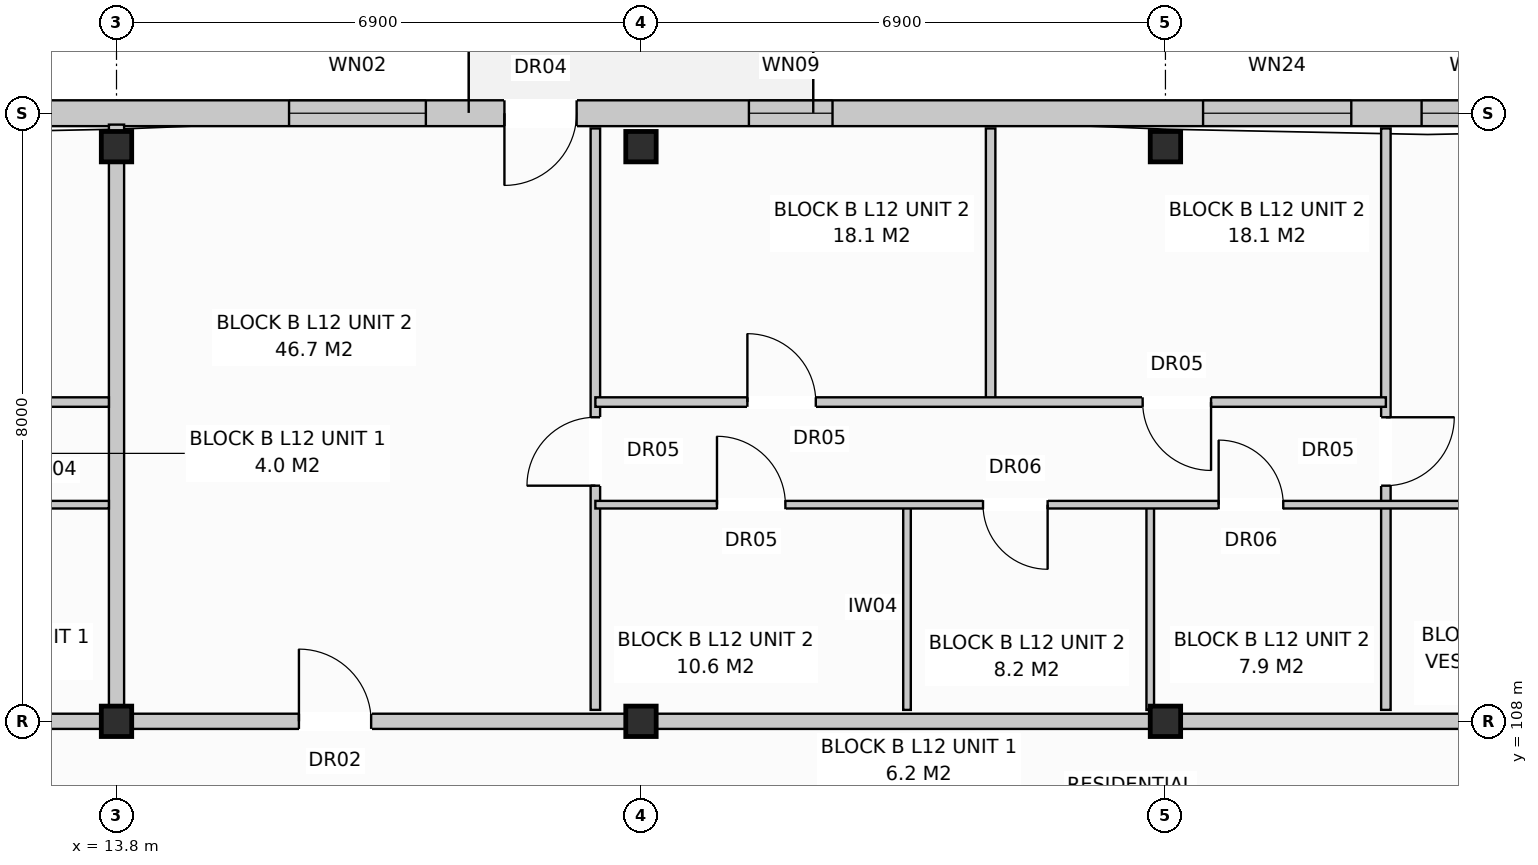
"""IFC4 building model, lengths in metres.
Left out: names, types, materials, properties, quantities, classifications, styles, units other than length and angle.
Written with IfcOpenShell. Run it as: python <this file> out.ifc"""

import sys

from ifc_helpers import new_model, si_unit, direction, frame, frame_2d, origin, origin_with_axes, origin_2d, place, context, subcontext, project, spatial, rectangle, extrude, element, fill, save


model = new_model("IFC4")
c1 = context("Model", 3, precision=1e-05, world=origin(), true_north=direction((0.0, 1.0)))
c2 = subcontext(c1, "Body", "Model", "MODEL_VIEW")
j1 = project(units=[si_unit("LENGTHUNIT", "METRE"), si_unit("PLANEANGLEUNIT", "RADIAN")], contexts=[c1])
p1 = place(None, origin())
s1 = spatial("IfcSite", under=j1, at=p1, CompositionType="ELEMENT")
p2 = place(p1, origin())
s2 = spatial("IfcBuilding", under=s1, at=p2, CompositionType="ELEMENT")
p3 = place(p2, frame((0.0, 0.0, 40.0)))
s3 = spatial("IfcBuildingStorey", under=s2, at=p3, CompositionType="ELEMENT", Elevation=40.0)
for number, where, z_axis, x_axis in (
    (1, (13.8, 108.0, 0.0), (0.0, 0.0, 1.0), (1.0, 0.0, 0.0)),
    (2, (13.8, 115.56, 0.0), (0.0, 0.0, 1.0), (1.0, 0.0, 0.0)),
    (3, (20.7, 108.0, 0.0), (0.0, 0.0, 1.0), (1.0, 0.0, 0.0)),
    (4, (20.7, 115.56, 0.0), (0.0, 0.0, 1.0), (1.0, 0.0, 0.0)),
    (5, (27.6, 108.0, 0.0), (0.0, 0.0, 1.0), (1.0, 0.0, 0.0)),
    (6, (27.6, 115.56, 0.0), (0.0, 0.0, 1.0), (1.0, 0.0, 0.0)),
):
    element("IfcColumn", number, at=place(p3, frame(where, z_axis=z_axis, x_axis=x_axis)), inside=s3, PredefinedType="COLUMN", context=c2, shape_type="SweptSolid", body=[
        extrude(rectangle(XDim=0.4, YDim=0.4, at=origin_2d()), origin(), (0.0, 0.0, 1.0), 3.2),
    ])
p4 = place(p3, frame((0.16, 116.0, 0.0), z_axis=(0.0, 0.0, 1.0), x_axis=(1.0, 0.0, 0.0)))
e7 = element("IfcWall", 7, at=p4, inside=s3, PredefinedType="STANDARD", context=c2, shape_type="SweptSolid", body=[
    extrude(rectangle(XDim=41.08, YDim=0.34, at=frame_2d((20.54, 0.0))), origin(), (0.0, 0.0, 1.0), 2.91),
])
p5 = place(p4, frame((7.41, 0.0, 0.0)))
e8 = element("IfcOpeningElement", 8, at=p5, cuts=e7, PredefinedType="OPENING", context=c2, shape_type="SweptSolid", body=[
    extrude(rectangle(XDim=0.95, YDim=2.1, at=frame_2d((0.475, 1.05))), frame((0.0, 0.182, 0.0), z_axis=(0.0, -1.0, 0.0), x_axis=(1.0, 0.0, 0.0)), (0.0, 0.0, 1.0), 0.364),
])
p6 = place(p4, frame((18.744, 0.0, 0.0)))
e9 = element("IfcOpeningElement", 9, at=p6, cuts=e7, PredefinedType="OPENING", context=c2, shape_type="SweptSolid", body=[
    extrude(rectangle(XDim=0.95, YDim=2.1, at=frame_2d((0.475, 1.05))), frame((0.0, 0.182, 0.0), z_axis=(0.0, -1.0, 0.0), x_axis=(1.0, 0.0, 0.0)), (0.0, 0.0, 1.0), 0.364),
])
p7 = place(p4, frame((32.694, 0.0, 0.0)))
e10 = element("IfcOpeningElement", 10, at=p7, cuts=e7, PredefinedType="OPENING", context=c2, shape_type="SweptSolid", body=[
    extrude(rectangle(XDim=0.95, YDim=2.1, at=frame_2d((0.475, 1.05))), frame((0.0, 0.182, 0.0), z_axis=(0.0, -1.0, 0.0), x_axis=(1.0, 0.0, 0.0)), (0.0, 0.0, 1.0), 0.364),
])
p8 = place(p4, frame((1.56, 0.0, 0.8)))
e11 = element("IfcOpeningElement", 11, at=p8, cuts=e7, PredefinedType="OPENING", context=c2, shape_type="SweptSolid", body=[
    extrude(rectangle(XDim=1.9, YDim=1.85, at=frame_2d((0.95, 0.925))), frame((0.0, 0.182, 0.0), z_axis=(0.0, -1.0, 0.0), x_axis=(1.0, 0.0, 0.0)), (0.0, 0.0, 1.0), 0.364),
])
p9 = place(p4, frame((10.435, 0.0, 0.8)))
e12 = element("IfcOpeningElement", 12, at=p9, cuts=e7, PredefinedType="OPENING", context=c2, shape_type="SweptSolid", body=[
    extrude(rectangle(XDim=1.95, YDim=1.65, at=frame_2d((0.975, 0.825))), frame((0.0, 0.182, 0.0), z_axis=(0.0, -1.0, 0.0), x_axis=(1.0, 0.0, 0.0)), (0.0, 0.0, 1.0), 0.364),
])
p10 = place(p4, frame((15.91, 0.0, 0.8)))
e13 = element("IfcOpeningElement", 13, at=p10, cuts=e7, PredefinedType="OPENING", context=c2, shape_type="SweptSolid", body=[
    extrude(rectangle(XDim=1.8, YDim=1.7, at=frame_2d((0.9, 0.85))), frame((0.0, 0.182, 0.0), z_axis=(0.0, -1.0, 0.0), x_axis=(1.0, 0.0, 0.0)), (0.0, 0.0, 1.0), 0.364),
])
p11 = place(p4, frame((21.96, 0.0, 0.72)))
e14 = element("IfcOpeningElement", 14, at=p11, cuts=e7, PredefinedType="OPENING", context=c2, shape_type="SweptSolid", body=[
    extrude(rectangle(XDim=1.1, YDim=1.5, at=frame_2d((0.55, 0.75))), frame((0.0, 0.182, 0.0), z_axis=(0.0, -1.0, 0.0), x_axis=(1.0, 0.0, 0.0)), (0.0, 0.0, 1.0), 0.364),
])
p12 = place(p4, frame((27.935, 0.0, 0.8)))
e15 = element("IfcOpeningElement", 15, at=p12, cuts=e7, PredefinedType="OPENING", context=c2, shape_type="SweptSolid", body=[
    extrude(rectangle(XDim=1.95, YDim=1.65, at=frame_2d((0.975, 0.825))), frame((0.0, 0.182, 0.0), z_axis=(0.0, -1.0, 0.0), x_axis=(1.0, 0.0, 0.0)), (0.0, 0.0, 1.0), 0.364),
])
p13 = place(p4, frame((30.81, 0.0, 0.85)))
e16 = element("IfcOpeningElement", 16, at=p13, cuts=e7, PredefinedType="OPENING", context=c2, shape_type="SweptSolid", body=[
    extrude(rectangle(XDim=1.5, YDim=1.65, at=frame_2d((0.75, 0.825))), frame((0.0, 0.182, 0.0), z_axis=(0.0, -1.0, 0.0), x_axis=(1.0, 0.0, 0.0)), (0.0, 0.0, 1.0), 0.364),
])
p14 = place(p4, frame((35.76, 0.0, 0.72)))
e17 = element("IfcOpeningElement", 17, at=p14, cuts=e7, PredefinedType="OPENING", context=c2, shape_type="SweptSolid", body=[
    extrude(rectangle(XDim=1.1, YDim=1.5, at=frame_2d((0.55, 0.75))), frame((0.0, 0.182, 0.0), z_axis=(0.0, -1.0, 0.0), x_axis=(1.0, 0.0, 0.0)), (0.0, 0.0, 1.0), 0.364),
])
p15 = place(p4, frame((38.525, 0.0, 0.8)))
e18 = element("IfcOpeningElement", 18, at=p15, cuts=e7, PredefinedType="OPENING", context=c2, shape_type="SweptSolid", body=[
    extrude(rectangle(XDim=1.95, YDim=1.65, at=frame_2d((0.975, 0.825))), frame((0.0, 0.182, 0.0), z_axis=(0.0, -1.0, 0.0), x_axis=(1.0, 0.0, 0.0)), (0.0, 0.0, 1.0), 0.364),
])
p16 = place(p3, frame((13.8, 108.15, 0.0), z_axis=(0.0, 0.0, 1.0), x_axis=(0.0, 1.0, 0.0)))
e19 = element("IfcWall", 19, at=p16, inside=s3, PredefinedType="PARTITIONING", context=c2, shape_type="SweptSolid", body=[
    extrude(rectangle(XDim=7.7, YDim=0.2, at=frame_2d((3.85, 0.0))), origin(), (0.0, 0.0, 1.0), 2.97),
])
p17 = place(p3, frame((0.0, 108.0, 0.0), z_axis=(0.0, 0.0, 1.0), x_axis=(1.0, 0.0, 0.0)))
e20 = element("IfcWall", 20, at=p17, inside=s3, PredefinedType="PARTITIONING", context=c2, shape_type="SweptSolid", body=[
    extrude(rectangle(XDim=13.8, YDim=0.2, at=frame_2d((6.9, 0.0))), origin(), (0.0, 0.0, 1.0), 2.35),
])
p18 = place(p17, frame((2.4, 0.0, 0.0)))
e21 = element("IfcOpeningElement", 21, at=p18, cuts=e20, PredefinedType="OPENING", context=c2, shape_type="SweptSolid", body=[
    extrude(rectangle(XDim=0.95, YDim=2.15, at=frame_2d((0.475, 1.075))), frame((0.0, 0.112, 0.0), z_axis=(0.0, -1.0, 0.0), x_axis=(1.0, 0.0, 0.0)), (0.0, 0.0, 1.0), 0.224),
])
p19 = place(p3, frame((5.2, 110.85, 0.0), z_axis=(0.0, 0.0, 1.0), x_axis=(1.0, 0.0, 0.0)))
e22 = element("IfcWall", 22, at=p19, inside=s3, PredefinedType="PARTITIONING", context=c2, shape_type="SweptSolid", body=[
    extrude(rectangle(XDim=8.5, YDim=0.1, at=frame_2d((4.25, 0.0))), origin(), (0.0, 0.0, 1.0), 2.97),
])
p20 = place(p19, frame((1.0, 0.0, 0.0)))
e23 = element("IfcOpeningElement", 23, at=p20, cuts=e22, PredefinedType="OPENING", context=c2, shape_type="SweptSolid", body=[
    extrude(rectangle(XDim=0.85, YDim=2.1, at=frame_2d((0.425, 1.05))), frame((0.0, 0.062, 0.0), z_axis=(0.0, -1.0, 0.0), x_axis=(1.0, 0.0, 0.0)), (0.0, 0.0, 1.0), 0.124),
])
p21 = place(p19, frame((3.4, 0.0, 0.0)))
e24 = element("IfcOpeningElement", 24, at=p21, cuts=e22, PredefinedType="OPENING", context=c2, shape_type="SweptSolid", body=[
    extrude(rectangle(XDim=0.85, YDim=2.05, at=frame_2d((0.425, 1.025))), frame((0.0, 0.062, 0.0), z_axis=(0.0, -1.0, 0.0), x_axis=(1.0, 0.0, 0.0)), (0.0, 0.0, 1.0), 0.124),
])
p22 = place(p19, frame((6.2, 0.0, 0.0)))
e25 = element("IfcOpeningElement", 25, at=p22, cuts=e22, PredefinedType="OPENING", context=c2, shape_type="SweptSolid", body=[
    extrude(rectangle(XDim=0.85, YDim=2.05, at=frame_2d((0.425, 1.025))), frame((0.0, 0.062, 0.0), z_axis=(0.0, -1.0, 0.0), x_axis=(1.0, 0.0, 0.0)), (0.0, 0.0, 1.0), 0.124),
])
p23 = place(p3, frame((5.2, 112.2, 0.0), z_axis=(0.0, 0.0, 1.0), x_axis=(1.0, 0.0, 0.0)))
e26 = element("IfcWall", 26, at=p23, inside=s3, PredefinedType="PARTITIONING", context=c2, shape_type="SweptSolid", body=[
    extrude(rectangle(XDim=8.5, YDim=0.125, at=frame_2d((4.25, 0.0))), origin(), (0.0, 0.0, 1.0), 2.97),
])
p24 = place(p23, frame((1.5, 0.0, 0.0)))
e27 = element("IfcOpeningElement", 27, at=p24, cuts=e26, PredefinedType="OPENING", context=c2, shape_type="SweptSolid", body=[
    extrude(rectangle(XDim=0.9, YDim=2.1, at=frame_2d((0.45, 1.05))), frame((0.0, 0.074, 0.0), z_axis=(0.0, -1.0, 0.0), x_axis=(1.0, 0.0, 0.0)), (0.0, 0.0, 1.0), 0.149),
])
p25 = place(p23, frame((5.6, 0.0, 0.0)))
e28 = element("IfcOpeningElement", 28, at=p25, cuts=e26, PredefinedType="OPENING", context=c2, shape_type="SweptSolid", body=[
    extrude(rectangle(XDim=0.9, YDim=2.1, at=frame_2d((0.45, 1.05))), frame((0.0, 0.074, 0.0), z_axis=(0.0, -1.0, 0.0), x_axis=(1.0, 0.0, 0.0)), (0.0, 0.0, 1.0), 0.149),
])
p26 = place(p3, frame((13.8, 108.0, 0.0), z_axis=(0.0, 0.0, 1.0), x_axis=(1.0, 0.0, 0.0)))
e29 = element("IfcWall", 29, at=p26, inside=s3, PredefinedType="PARTITIONING", context=c2, shape_type="SweptSolid", body=[
    extrude(rectangle(XDim=20.7, YDim=0.2, at=frame_2d((10.35, 0.0))), origin(), (0.0, 0.0, 1.0), 2.35),
])
p27 = place(p26, frame((2.4, 0.0, 0.0)))
e30 = element("IfcOpeningElement", 30, at=p27, cuts=e29, PredefinedType="OPENING", context=c2, shape_type="SweptSolid", body=[
    extrude(rectangle(XDim=0.95, YDim=2.15, at=frame_2d((0.475, 1.075))), frame((0.0, 0.112, 0.0), z_axis=(0.0, -1.0, 0.0), x_axis=(1.0, 0.0, 0.0)), (0.0, 0.0, 1.0), 0.224),
])
p28 = place(p3, frame((20.1, 108.15, 0.0), z_axis=(0.0, 0.0, 1.0), x_axis=(0.0, 1.0, 0.0)))
e31 = element("IfcWall", 31, at=p28, inside=s3, PredefinedType="PARTITIONING", context=c2, shape_type="SweptSolid", body=[
    extrude(rectangle(XDim=7.65, YDim=0.125, at=frame_2d((3.825, 0.0))), origin(), (0.0, 0.0, 1.0), 2.97),
])
p29 = place(p28, frame((2.95, 0.0, 0.0)))
e32 = element("IfcOpeningElement", 32, at=p29, cuts=e31, PredefinedType="OPENING", context=c2, shape_type="SweptSolid", body=[
    extrude(rectangle(XDim=0.9, YDim=2.1, at=frame_2d((0.45, 1.05))), frame((0.0, 0.074, 0.0), z_axis=(0.0, -1.0, 0.0), x_axis=(1.0, 0.0, 0.0)), (0.0, 0.0, 1.0), 0.149),
])
for number, where, z_axis, x_axis in (
    (33, (24.2, 108.15, 0.0), (0.0, 0.0, 1.0), (0.0, 1.0, 0.0)),
    (34, (27.4, 108.15, 0.0), (0.0, 0.0, 1.0), (0.0, 1.0, 0.0)),
):
    element("IfcWall", number, at=place(p3, frame(where, z_axis=z_axis, x_axis=x_axis)), inside=s3, PredefinedType="PARTITIONING", context=c2, shape_type="SweptSolid", body=[
        extrude(rectangle(XDim=2.7, YDim=0.1, at=frame_2d((1.35, 0.0))), origin(), (0.0, 0.0, 1.0), 2.97),
    ])
p30 = place(p3, frame((25.3, 112.2, 0.0), z_axis=(0.0, 0.0, 1.0), x_axis=(0.0, 1.0, 0.0)))
e35 = element("IfcWall", 35, at=p30, inside=s3, PredefinedType="PARTITIONING", context=c2, shape_type="SweptSolid", body=[
    extrude(rectangle(XDim=3.6, YDim=0.125, at=frame_2d((1.8, 0.0))), origin(), (0.0, 0.0, 1.0), 2.97),
])
p31 = place(p3, frame((30.5, 108.15, 0.0), z_axis=(0.0, 0.0, 1.0), x_axis=(0.0, 1.0, 0.0)))
e36 = element("IfcWall", 36, at=p31, inside=s3, PredefinedType="PARTITIONING", context=c2, shape_type="SweptSolid", body=[
    extrude(rectangle(XDim=7.65, YDim=0.125, at=frame_2d((3.825, 0.0))), origin(), (0.0, 0.0, 1.0), 2.97),
])
p32 = place(p31, frame((2.95, 0.0, 0.0)))
e37 = element("IfcOpeningElement", 37, at=p32, cuts=e36, PredefinedType="OPENING", context=c2, shape_type="SweptSolid", body=[
    extrude(rectangle(XDim=0.9, YDim=2.1, at=frame_2d((0.45, 1.05))), frame((0.0, 0.074, 0.0), z_axis=(0.0, -1.0, 0.0), x_axis=(1.0, 0.0, 0.0)), (0.0, 0.0, 1.0), 0.149),
])
p33 = place(p3, frame((20.1, 110.85, 0.0), z_axis=(0.0, 0.0, 1.0), x_axis=(1.0, 0.0, 0.0)))
e38 = element("IfcWall", 38, at=p33, inside=s3, PredefinedType="PARTITIONING", context=c2, shape_type="SweptSolid", body=[
    extrude(rectangle(XDim=14.3, YDim=0.1, at=frame_2d((7.15, 0.0))), origin(), (0.0, 0.0, 1.0), 2.97),
])
p34 = place(p33, frame((1.6, 0.0, 0.0)))
e39 = element("IfcOpeningElement", 39, at=p34, cuts=e38, PredefinedType="OPENING", context=c2, shape_type="SweptSolid", body=[
    extrude(rectangle(XDim=0.9, YDim=2.1, at=frame_2d((0.45, 1.05))), frame((0.0, 0.062, 0.0), z_axis=(0.0, -1.0, 0.0), x_axis=(1.0, 0.0, 0.0)), (0.0, 0.0, 1.0), 0.124),
])
p35 = place(p33, frame((5.1, 0.0, 0.0)))
e40 = element("IfcOpeningElement", 40, at=p35, cuts=e38, PredefinedType="OPENING", context=c2, shape_type="SweptSolid", body=[
    extrude(rectangle(XDim=0.85, YDim=2.05, at=frame_2d((0.425, 1.025))), frame((0.0, 0.062, 0.0), z_axis=(0.0, -1.0, 0.0), x_axis=(1.0, 0.0, 0.0)), (0.0, 0.0, 1.0), 0.124),
])
p36 = place(p33, frame((8.2, 0.0, 0.0)))
e41 = element("IfcOpeningElement", 41, at=p36, cuts=e38, PredefinedType="OPENING", context=c2, shape_type="SweptSolid", body=[
    extrude(rectangle(XDim=0.85, YDim=2.05, at=frame_2d((0.425, 1.025))), frame((0.0, 0.062, 0.0), z_axis=(0.0, -1.0, 0.0), x_axis=(1.0, 0.0, 0.0)), (0.0, 0.0, 1.0), 0.124),
])
p37 = place(p33, frame((11.6, 0.0, 0.0)))
e42 = element("IfcOpeningElement", 42, at=p37, cuts=e38, PredefinedType="OPENING", context=c2, shape_type="SweptSolid", body=[
    extrude(rectangle(XDim=0.85, YDim=2.05, at=frame_2d((0.425, 1.025))), frame((0.0, 0.062, 0.0), z_axis=(0.0, -1.0, 0.0), x_axis=(1.0, 0.0, 0.0)), (0.0, 0.0, 1.0), 0.124),
])
p38 = place(p3, frame((20.1, 112.2, 0.0), z_axis=(0.0, 0.0, 1.0), x_axis=(1.0, 0.0, 0.0)))
e43 = element("IfcWall", 43, at=p38, inside=s3, PredefinedType="PARTITIONING", context=c2, shape_type="SweptSolid", body=[
    extrude(rectangle(XDim=10.4, YDim=0.125, at=frame_2d((5.2, 0.0))), origin(), (0.0, 0.0, 1.0), 2.97),
])
p39 = place(p38, frame((2.0, 0.0, 0.0)))
e44 = element("IfcOpeningElement", 44, at=p39, cuts=e43, PredefinedType="OPENING", context=c2, shape_type="SweptSolid", body=[
    extrude(rectangle(XDim=0.9, YDim=2.1, at=frame_2d((0.45, 1.05))), frame((0.0, 0.074, 0.0), z_axis=(0.0, -1.0, 0.0), x_axis=(1.0, 0.0, 0.0)), (0.0, 0.0, 1.0), 0.149),
])
p40 = place(p38, frame((7.2, 0.0, 0.0)))
e45 = element("IfcOpeningElement", 45, at=p40, cuts=e43, PredefinedType="OPENING", context=c2, shape_type="SweptSolid", body=[
    extrude(rectangle(XDim=0.9, YDim=2.1, at=frame_2d((0.45, 1.05))), frame((0.0, 0.074, 0.0), z_axis=(0.0, -1.0, 0.0), x_axis=(1.0, 0.0, 0.0)), (0.0, 0.0, 1.0), 0.149),
])
p41 = place(p6, frame((0.95, 0.0, 0.0), z_axis=(0.0, 0.0, 1.0), x_axis=(-1.0, 0.0, 0.0)))
e46 = element("IfcDoor", 46, at=p41, inside=s3, OperationType="SINGLE_SWING_LEFT", PredefinedType="DOOR", context=c2, shape_type="SweptSolid", body=[
    extrude(rectangle(XDim=0.95, YDim=2.1, at=frame_2d((0.475, 1.05))), frame((0.0, 0.025, 0.0), z_axis=(0.0, -1.0, 0.0), x_axis=(1.0, 0.0, 0.0)), (0.0, 0.0, 1.0), 0.05),
])
fill(e9, e46)
p42 = place(p10, origin_with_axes())
e47 = element("IfcWindow", 47, at=p42, inside=s3, PartitioningType="SINGLE_PANEL", PredefinedType="WINDOW", context=c2, shape_type="SweptSolid", body=[
    extrude(rectangle(XDim=1.8, YDim=1.7, at=frame_2d((0.9, 0.85))), frame((0.0, 0.03, 0.0), z_axis=(0.0, -1.0, 0.0), x_axis=(1.0, 0.0, 0.0)), (0.0, 0.0, 1.0), 0.06),
])
fill(e13, e47)
p43 = place(p11, origin_with_axes())
e48 = element("IfcWindow", 48, at=p43, inside=s3, PartitioningType="SINGLE_PANEL", PredefinedType="WINDOW", context=c2, shape_type="SweptSolid", body=[
    extrude(rectangle(XDim=1.1, YDim=1.5, at=frame_2d((0.55, 0.75))), frame((0.0, 0.03, 0.0), z_axis=(0.0, -1.0, 0.0), x_axis=(1.0, 0.0, 0.0)), (0.0, 0.0, 1.0), 0.06),
])
fill(e14, e48)
p44 = place(p12, origin_with_axes())
e49 = element("IfcWindow", 49, at=p44, inside=s3, PartitioningType="SINGLE_PANEL", PredefinedType="WINDOW", context=c2, shape_type="SweptSolid", body=[
    extrude(rectangle(XDim=1.95, YDim=1.65, at=frame_2d((0.975, 0.825))), frame((0.0, 0.03, 0.0), z_axis=(0.0, -1.0, 0.0), x_axis=(1.0, 0.0, 0.0)), (0.0, 0.0, 1.0), 0.06),
])
fill(e15, e49)
p45 = place(p13, origin_with_axes())
e50 = element("IfcWindow", 50, at=p45, inside=s3, PartitioningType="SINGLE_PANEL", PredefinedType="WINDOW", context=c2, shape_type="SweptSolid", body=[
    extrude(rectangle(XDim=1.5, YDim=1.65, at=frame_2d((0.75, 0.825))), frame((0.0, 0.03, 0.0), z_axis=(0.0, -1.0, 0.0), x_axis=(1.0, 0.0, 0.0)), (0.0, 0.0, 1.0), 0.06),
])
fill(e16, e50)
p46 = place(p27, origin_with_axes())
e51 = element("IfcDoor", 51, at=p46, inside=s3, OperationType="SINGLE_SWING_LEFT", PredefinedType="DOOR", context=c2, shape_type="SweptSolid", body=[
    extrude(rectangle(XDim=0.95, YDim=2.15, at=frame_2d((0.475, 1.075))), frame((0.0, 0.025, 0.0), z_axis=(0.0, -1.0, 0.0), x_axis=(1.0, 0.0, 0.0)), (0.0, 0.0, 1.0), 0.05),
])
fill(e30, e51)
p47 = place(p29, origin_with_axes())
e52 = element("IfcDoor", 52, at=p47, inside=s3, OperationType="SINGLE_SWING_LEFT", PredefinedType="DOOR", context=c2, shape_type="SweptSolid", body=[
    extrude(rectangle(XDim=0.9, YDim=2.1, at=frame_2d((0.45, 1.05))), frame((0.0, 0.025, 0.0), z_axis=(0.0, -1.0, 0.0), x_axis=(1.0, 0.0, 0.0)), (0.0, 0.0, 1.0), 0.05),
])
fill(e32, e52)
p48 = place(p32, frame((0.9, 0.0, 0.0), z_axis=(0.0, 0.0, 1.0), x_axis=(-1.0, 0.0, 0.0)))
e53 = element("IfcDoor", 53, at=p48, inside=s3, OperationType="SINGLE_SWING_RIGHT", PredefinedType="DOOR", context=c2, shape_type="SweptSolid", body=[
    extrude(rectangle(XDim=0.9, YDim=2.1, at=frame_2d((0.45, 1.05))), frame((0.0, 0.025, 0.0), z_axis=(0.0, -1.0, 0.0), x_axis=(1.0, 0.0, 0.0)), (0.0, 0.0, 1.0), 0.05),
])
fill(e37, e53)
p49 = place(p34, origin_with_axes())
e54 = element("IfcDoor", 54, at=p49, inside=s3, OperationType="SINGLE_SWING_LEFT", PredefinedType="DOOR", context=c2, shape_type="SweptSolid", body=[
    extrude(rectangle(XDim=0.9, YDim=2.1, at=frame_2d((0.45, 1.05))), frame((0.0, 0.025, 0.0), z_axis=(0.0, -1.0, 0.0), x_axis=(1.0, 0.0, 0.0)), (0.0, 0.0, 1.0), 0.05),
])
fill(e39, e54)
p50 = place(p35, frame((0.85, 0.0, 0.0), z_axis=(0.0, 0.0, 1.0), x_axis=(-1.0, 0.0, 0.0)))
e55 = element("IfcDoor", 55, at=p50, inside=s3, OperationType="SINGLE_SWING_RIGHT", PredefinedType="DOOR", context=c2, shape_type="SweptSolid", body=[
    extrude(rectangle(XDim=0.85, YDim=2.05, at=frame_2d((0.425, 1.025))), frame((0.0, 0.025, 0.0), z_axis=(0.0, -1.0, 0.0), x_axis=(1.0, 0.0, 0.0)), (0.0, 0.0, 1.0), 0.05),
])
fill(e40, e55)
p51 = place(p36, origin_with_axes())
e56 = element("IfcDoor", 56, at=p51, inside=s3, OperationType="SINGLE_SWING_LEFT", PredefinedType="DOOR", context=c2, shape_type="SweptSolid", body=[
    extrude(rectangle(XDim=0.85, YDim=2.05, at=frame_2d((0.425, 1.025))), frame((0.0, 0.025, 0.0), z_axis=(0.0, -1.0, 0.0), x_axis=(1.0, 0.0, 0.0)), (0.0, 0.0, 1.0), 0.05),
])
fill(e41, e56)
p52 = place(p39, origin_with_axes())
e57 = element("IfcDoor", 57, at=p52, inside=s3, OperationType="SINGLE_SWING_LEFT", PredefinedType="DOOR", context=c2, shape_type="SweptSolid", body=[
    extrude(rectangle(XDim=0.9, YDim=2.1, at=frame_2d((0.45, 1.05))), frame((0.0, 0.025, 0.0), z_axis=(0.0, -1.0, 0.0), x_axis=(1.0, 0.0, 0.0)), (0.0, 0.0, 1.0), 0.05),
])
fill(e44, e57)
p53 = place(p40, frame((0.9, 0.0, 0.0), z_axis=(0.0, 0.0, 1.0), x_axis=(-1.0, 0.0, 0.0)))
e58 = element("IfcDoor", 58, at=p53, inside=s3, OperationType="SINGLE_SWING_RIGHT", PredefinedType="DOOR", context=c2, shape_type="SweptSolid", body=[
    extrude(rectangle(XDim=0.9, YDim=2.1, at=frame_2d((0.45, 1.05))), frame((0.0, 0.025, 0.0), z_axis=(0.0, -1.0, 0.0), x_axis=(1.0, 0.0, 0.0)), (0.0, 0.0, 1.0), 0.05),
])
fill(e45, e58)
save(model, sys.argv[1])
